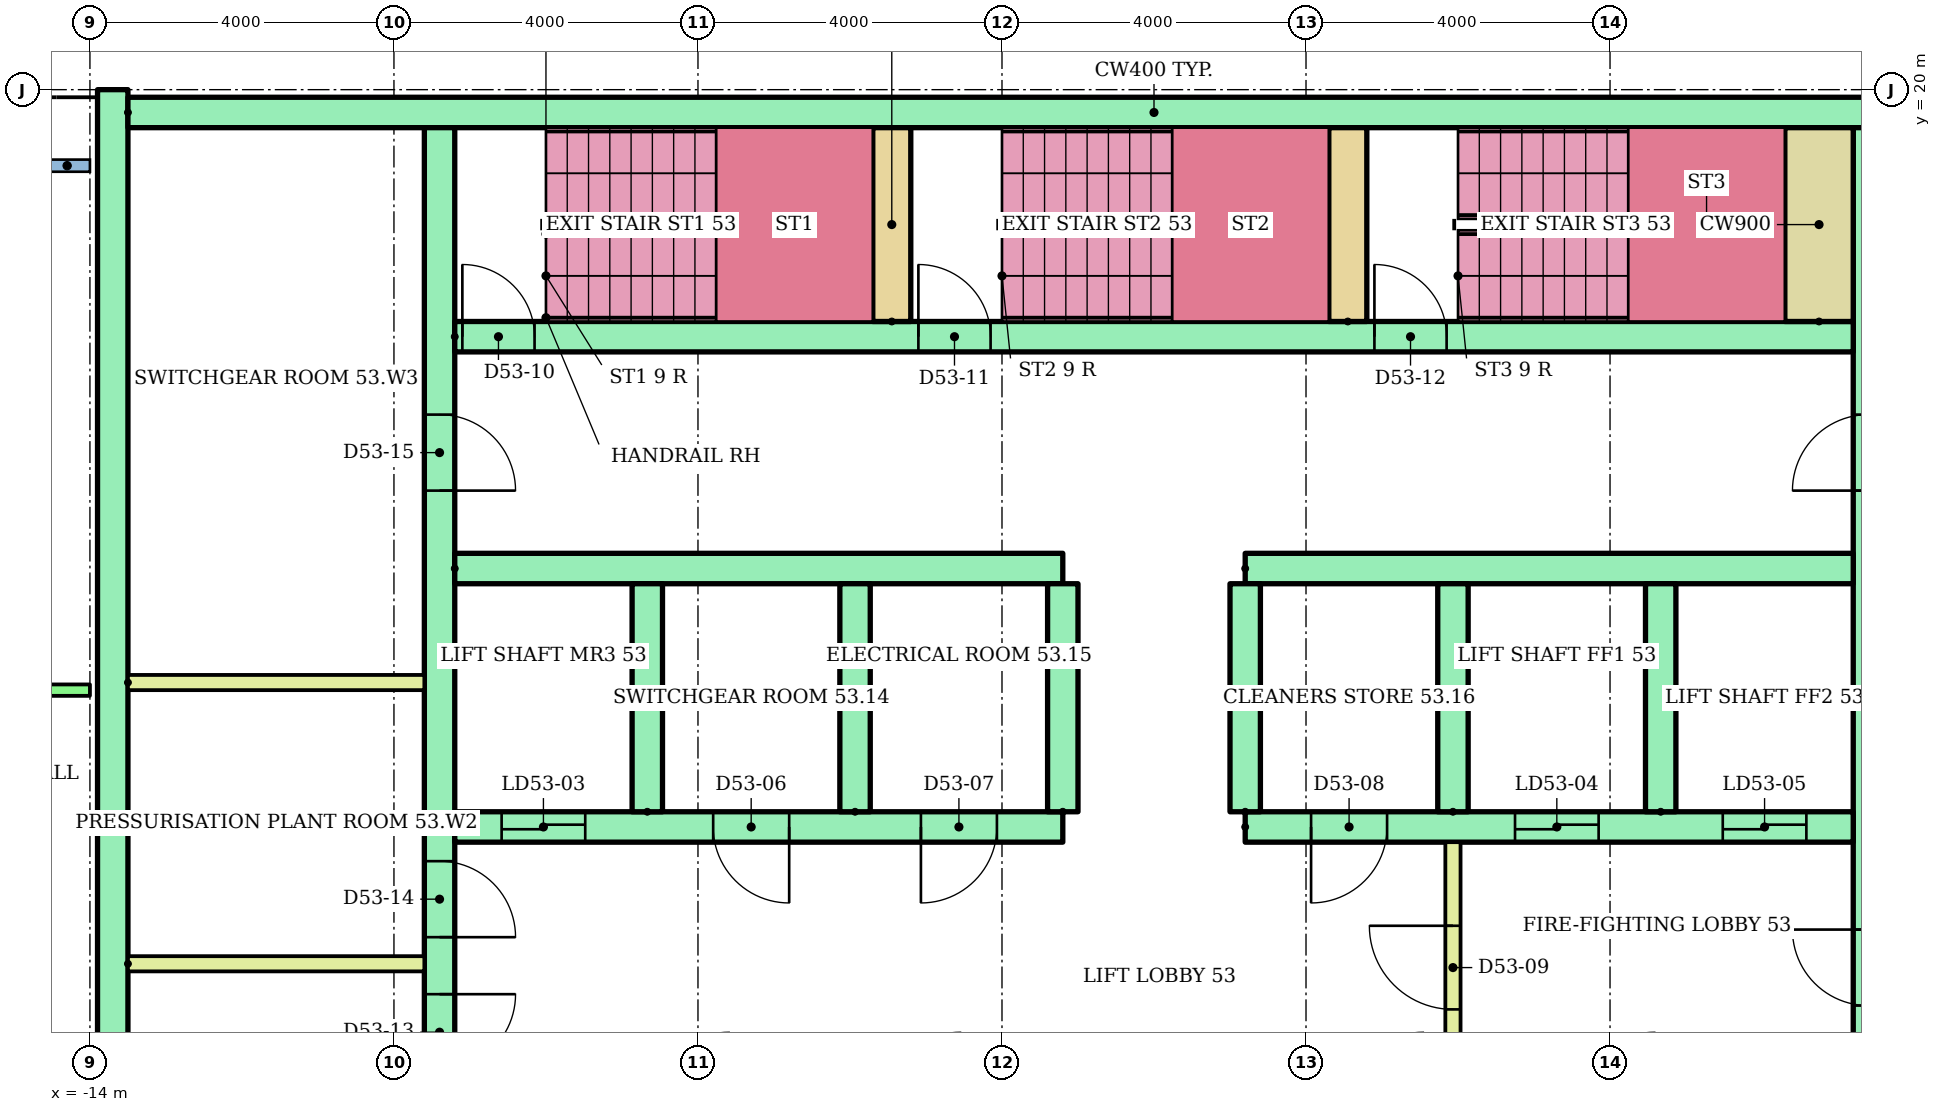
"""IFC4 building model, lengths in metres.
Left out: names, types, materials, properties, quantities, classifications, styles, units other than length and angle.
Written with IfcOpenShell. Run it as: python <this file> out.ifc"""

import sys

from ifc_helpers import new_model, si_unit, direction, frame, frame_2d, origin, place, context, subcontext, project, spatial, rectangle, extrude, element, fill, save


model = new_model("IFC4")
c1 = context("Model", 3, precision=1e-05, world=origin(), true_north=direction((0.0, 1.0)))
c2 = subcontext(c1, "Body", "Model", "MODEL_VIEW")
j1 = project(units=[si_unit("LENGTHUNIT", "METRE"), si_unit("PLANEANGLEUNIT", "RADIAN")], contexts=[c1])
p1 = place(None, origin())
s1 = spatial("IfcSite", under=j1, at=p1, CompositionType="ELEMENT")
p2 = place(p1, origin())
s2 = spatial("IfcBuilding", under=s1, at=p2, CompositionType="ELEMENT")
p3 = place(p2, frame((0.0, 0.0, 207.6)))
s3 = spatial("IfcBuildingStorey", under=s2, at=p3, CompositionType="ELEMENT", Elevation=207.6)
p4 = place(p3, frame((-13.7, 3.0, 0.0), z_axis=(0.0, 0.0, 1.0), x_axis=(0.0, 1.0, 0.0)))
e1 = element("IfcWall", 1, at=p4, inside=s3, PredefinedType="SHEAR", context=c2, shape_type="SweptSolid", body=[
    extrude(rectangle(XDim=17.0, YDim=0.4, at=frame_2d((8.5, 0.0))), origin(), (0.0, 0.0, 1.0), 2.92),
])
p5 = place(p3, frame((-13.5, 19.7, 0.0)))
e2 = element("IfcWall", 2, at=p5, inside=s3, PredefinedType="SHEAR", context=c2, shape_type="SweptSolid", body=[
    extrude(rectangle(XDim=27.0, YDim=0.4, at=frame_2d((13.5, 0.0))), origin(), (0.0, 0.0, 1.0), 2.92),
])
p6 = place(p3, frame((-9.4, 6.8, 0.0), z_axis=(0.0, 0.0, 1.0), x_axis=(0.0, 1.0, 0.0)))
e3 = element("IfcWall", 3, at=p6, inside=s3, PredefinedType="SHEAR", context=c2, shape_type="SweptSolid", body=[
    extrude(rectangle(XDim=12.7, YDim=0.4, at=frame_2d((6.35, 0.0))), origin(), (0.0, 0.0, 1.0), 2.92),
])
p7 = place(p6, frame((0.3, 0.0, 0.0)))
e4 = element("IfcOpeningElement", 4, at=p7, cuts=e3, PredefinedType="OPENING", context=c2, shape_type="SweptSolid", body=[
    extrude(rectangle(XDim=1.0, YDim=2.1, at=frame_2d((0.5, 1.05))), frame((0.0, 0.21, 0.0), z_axis=(0.0, -1.0, 0.0), x_axis=(1.0, 0.0, 0.0)), (0.0, 0.0, 1.0), 0.42),
])
p8 = place(p6, frame((2.05, 0.0, 0.0)))
e5 = element("IfcOpeningElement", 5, at=p8, cuts=e3, PredefinedType="OPENING", context=c2, shape_type="SweptSolid", body=[
    extrude(rectangle(XDim=1.0, YDim=2.1, at=frame_2d((0.5, 1.05))), frame((0.0, 0.21, 0.0), z_axis=(0.0, -1.0, 0.0), x_axis=(1.0, 0.0, 0.0)), (0.0, 0.0, 1.0), 0.42),
])
p9 = place(p6, frame((7.925, 0.0, 0.0)))
e6 = element("IfcOpeningElement", 6, at=p9, cuts=e3, PredefinedType="OPENING", context=c2, shape_type="SweptSolid", body=[
    extrude(rectangle(XDim=1.0, YDim=2.1, at=frame_2d((0.5, 1.05))), frame((0.0, 0.21, 0.0), z_axis=(0.0, -1.0, 0.0), x_axis=(1.0, 0.0, 0.0)), (0.0, 0.0, 1.0), 0.42),
])
p10 = place(p3, frame((9.4, 6.8, 0.0), z_axis=(0.0, 0.0, 1.0), x_axis=(0.0, 1.0, 0.0)))
e7 = element("IfcWall", 7, at=p10, inside=s3, PredefinedType="SHEAR", context=c2, shape_type="SweptSolid", body=[
    extrude(rectangle(XDim=12.7, YDim=0.4, at=frame_2d((6.35, 0.0))), origin(), (0.0, 0.0, 1.0), 2.92),
])
p11 = place(p10, frame((1.15, 0.0, 0.0)))
e8 = element("IfcOpeningElement", 8, at=p11, cuts=e7, PredefinedType="OPENING", context=c2, shape_type="SweptSolid", body=[
    extrude(rectangle(XDim=1.0, YDim=2.1, at=frame_2d((0.5, 1.05))), frame((0.0, 0.21, 0.0), z_axis=(0.0, -1.0, 0.0), x_axis=(1.0, 0.0, 0.0)), (0.0, 0.0, 1.0), 0.42),
])
p12 = place(p10, frame((7.925, 0.0, 0.0)))
e9 = element("IfcOpeningElement", 9, at=p12, cuts=e7, PredefinedType="OPENING", context=c2, shape_type="SweptSolid", body=[
    extrude(rectangle(XDim=1.0, YDim=2.1, at=frame_2d((0.5, 1.05))), frame((0.0, 0.21, 0.0), z_axis=(0.0, -1.0, 0.0), x_axis=(1.0, 0.0, 0.0)), (0.0, 0.0, 1.0), 0.42),
])
p13 = place(p3, frame((-9.2, 10.3, 0.0)))
e10 = element("IfcWall", 10, at=p13, inside=s3, PredefinedType="SHEAR", context=c2, shape_type="SweptSolid", body=[
    extrude(rectangle(XDim=8.0, YDim=0.4, at=frame_2d((4.0, 0.0))), origin(), (0.0, 0.0, 1.0), 2.92),
])
p14 = place(p13, frame((0.617, 0.0, 0.0)))
e11 = element("IfcOpeningElement", 11, at=p14, cuts=e10, PredefinedType="OPENING", context=c2, shape_type="SweptSolid", body=[
    extrude(rectangle(XDim=1.1, YDim=2.1, at=frame_2d((0.55, 1.05))), frame((0.0, 0.21, 0.0), z_axis=(0.0, -1.0, 0.0), x_axis=(1.0, 0.0, 0.0)), (0.0, 0.0, 1.0), 0.42),
])
p15 = place(p13, frame((3.4, 0.0, 0.0)))
e12 = element("IfcOpeningElement", 12, at=p15, cuts=e10, PredefinedType="OPENING", context=c2, shape_type="SweptSolid", body=[
    extrude(rectangle(XDim=1.0, YDim=2.1, at=frame_2d((0.5, 1.05))), frame((0.0, 0.21, 0.0), z_axis=(0.0, -1.0, 0.0), x_axis=(1.0, 0.0, 0.0)), (0.0, 0.0, 1.0), 0.42),
])
p16 = place(p13, frame((6.133, 0.0, 0.0)))
e13 = element("IfcOpeningElement", 13, at=p16, cuts=e10, PredefinedType="OPENING", context=c2, shape_type="SweptSolid", body=[
    extrude(rectangle(XDim=1.0, YDim=2.1, at=frame_2d((0.5, 1.05))), frame((0.0, 0.21, 0.0), z_axis=(0.0, -1.0, 0.0), x_axis=(1.0, 0.0, 0.0)), (0.0, 0.0, 1.0), 0.42),
])
p17 = place(p3, frame((-9.2, 13.7, 0.0)))
e14 = element("IfcWall", 14, at=p17, inside=s3, PredefinedType="SHEAR", context=c2, shape_type="SweptSolid", body=[
    extrude(rectangle(XDim=8.0, YDim=0.4, at=frame_2d((4.0, 0.0))), origin(), (0.0, 0.0, 1.0), 2.92),
])
p18 = place(p3, frame((1.2, 10.3, 0.0)))
e15 = element("IfcWall", 15, at=p18, inside=s3, PredefinedType="SHEAR", context=c2, shape_type="SweptSolid", body=[
    extrude(rectangle(XDim=8.0, YDim=0.4, at=frame_2d((4.0, 0.0))), origin(), (0.0, 0.0, 1.0), 2.92),
])
p19 = place(p18, frame((3.55, 0.0, 0.0)))
e16 = element("IfcOpeningElement", 16, at=p19, cuts=e15, PredefinedType="OPENING", context=c2, shape_type="SweptSolid", body=[
    extrude(rectangle(XDim=1.1, YDim=2.1, at=frame_2d((0.55, 1.05))), frame((0.0, 0.21, 0.0), z_axis=(0.0, -1.0, 0.0), x_axis=(1.0, 0.0, 0.0)), (0.0, 0.0, 1.0), 0.42),
])
p20 = place(p18, frame((6.283, 0.0, 0.0)))
e17 = element("IfcOpeningElement", 17, at=p20, cuts=e15, PredefinedType="OPENING", context=c2, shape_type="SweptSolid", body=[
    extrude(rectangle(XDim=1.1, YDim=2.1, at=frame_2d((0.55, 1.05))), frame((0.0, 0.21, 0.0), z_axis=(0.0, -1.0, 0.0), x_axis=(1.0, 0.0, 0.0)), (0.0, 0.0, 1.0), 0.42),
])
p21 = place(p18, frame((0.867, 0.0, 0.0)))
e18 = element("IfcOpeningElement", 18, at=p21, cuts=e15, PredefinedType="OPENING", context=c2, shape_type="SweptSolid", body=[
    extrude(rectangle(XDim=1.0, YDim=2.1, at=frame_2d((0.5, 1.05))), frame((0.0, 0.21, 0.0), z_axis=(0.0, -1.0, 0.0), x_axis=(1.0, 0.0, 0.0)), (0.0, 0.0, 1.0), 0.42),
])
p22 = place(p3, frame((1.2, 13.7, 0.0)))
e19 = element("IfcWall", 19, at=p22, inside=s3, PredefinedType="SHEAR", context=c2, shape_type="SweptSolid", body=[
    extrude(rectangle(XDim=8.0, YDim=0.4, at=frame_2d((4.0, 0.0))), origin(), (0.0, 0.0, 1.0), 2.92),
])
for number, where, z_axis, x_axis in (
    (20, (-6.667, 10.5, 0.0), (0.0, 0.0, 1.0), (0.0, 1.0, 0.0)),
    (21, (-3.933, 10.5, 0.0), (0.0, 0.0, 1.0), (0.0, 1.0, 0.0)),
    (22, (-1.2, 10.5, 0.0), (0.0, 0.0, 1.0), (0.0, 1.0, 0.0)),
    (23, (1.2, 10.5, 0.0), (0.0, 0.0, 1.0), (0.0, 1.0, 0.0)),
    (24, (3.933, 10.5, 0.0), (0.0, 0.0, 1.0), (0.0, 1.0, 0.0)),
    (25, (6.667, 10.5, 0.0), (0.0, 0.0, 1.0), (0.0, 1.0, 0.0)),
):
    element("IfcWall", number, at=place(p3, frame(where, z_axis=z_axis, x_axis=x_axis)), inside=s3, PredefinedType="SHEAR", context=c2, shape_type="SweptSolid", body=[
        extrude(rectangle(XDim=3.0, YDim=0.4, at=frame_2d((1.5, 0.0))), origin(), (0.0, 0.0, 1.0), 2.92),
    ])
p23 = place(p3, frame((3.933, 6.8, 0.0), z_axis=(0.0, 0.0, 1.0), x_axis=(0.0, 1.0, 0.0)))
e26 = element("IfcWall", 26, at=p23, inside=s3, PredefinedType="PARTITIONING", context=c2, shape_type="SweptSolid", body=[
    extrude(rectangle(XDim=3.3, YDim=0.2, at=frame_2d((1.65, 0.0))), origin(), (0.0, 0.0, 1.0), 2.92),
])
p24 = place(p23, frame((1.1, 0.0, 0.0)))
e27 = element("IfcOpeningElement", 27, at=p24, cuts=e26, PredefinedType="OPENING", context=c2, shape_type="SweptSolid", body=[
    extrude(rectangle(XDim=1.1, YDim=2.1, at=frame_2d((0.55, 1.05))), frame((0.0, 0.11, 0.0), z_axis=(0.0, -1.0, 0.0), x_axis=(1.0, 0.0, 0.0)), (0.0, 0.0, 1.0), 0.22),
])
p25 = place(p3, frame((-9.2, 16.75, 0.0)))
e28 = element("IfcWall", 28, at=p25, inside=s3, PredefinedType="SHEAR", context=c2, shape_type="SweptSolid", body=[
    extrude(rectangle(XDim=18.4, YDim=0.4, at=frame_2d((9.2, 0.0))), origin(), (0.0, 0.0, 1.0), 2.92),
])
p26 = place(p25, frame((0.1, 0.0, 0.0)))
e29 = element("IfcOpeningElement", 29, at=p26, cuts=e28, PredefinedType="OPENING", context=c2, shape_type="SweptSolid", body=[
    extrude(rectangle(XDim=0.95, YDim=2.1, at=frame_2d((0.475, 1.05))), frame((0.0, 0.21, 0.0), z_axis=(0.0, -1.0, 0.0), x_axis=(1.0, 0.0, 0.0)), (0.0, 0.0, 1.0), 0.42),
])
p27 = place(p25, frame((6.1, 0.0, 0.0)))
e30 = element("IfcOpeningElement", 30, at=p27, cuts=e28, PredefinedType="OPENING", context=c2, shape_type="SweptSolid", body=[
    extrude(rectangle(XDim=0.95, YDim=2.1, at=frame_2d((0.475, 1.05))), frame((0.0, 0.21, 0.0), z_axis=(0.0, -1.0, 0.0), x_axis=(1.0, 0.0, 0.0)), (0.0, 0.0, 1.0), 0.42),
])
p28 = place(p25, frame((12.1, 0.0, 0.0)))
e31 = element("IfcOpeningElement", 31, at=p28, cuts=e28, PredefinedType="OPENING", context=c2, shape_type="SweptSolid", body=[
    extrude(rectangle(XDim=0.95, YDim=2.1, at=frame_2d((0.475, 1.05))), frame((0.0, 0.21, 0.0), z_axis=(0.0, -1.0, 0.0), x_axis=(1.0, 0.0, 0.0)), (0.0, 0.0, 1.0), 0.42),
])
for number, where, z_axis, x_axis in (
    (32, (-3.45, 16.95, 0.0), (0.0, 0.0, 1.0), (0.0, 1.0, 0.0)),
    (33, (2.55, 16.95, 0.0), (0.0, 0.0, 1.0), (0.0, 1.0, 0.0)),
):
    element("IfcWall", number, at=place(p3, frame(where, z_axis=z_axis, x_axis=x_axis)), inside=s3, PredefinedType="SHEAR", context=c2, shape_type="SweptSolid", body=[
        extrude(rectangle(XDim=2.55, YDim=0.5, at=frame_2d((1.275, 0.0))), origin(), (0.0, 0.0, 1.0), 2.92),
    ])
p29 = place(p3, frame((8.75, 16.95, 0.0), z_axis=(0.0, 0.0, 1.0), x_axis=(0.0, 1.0, 0.0)))
e34 = element("IfcWall", 34, at=p29, inside=s3, PredefinedType="SHEAR", context=c2, shape_type="SweptSolid", body=[
    extrude(rectangle(XDim=2.55, YDim=0.9, at=frame_2d((1.275, 0.0))), origin(), (0.0, 0.0, 1.0), 2.92),
])
for number, where in (
    (35, (-13.5, 8.5, 0.0)),
    (36, (-13.5, 12.2, 0.0)),
):
    element("IfcWall", number, at=place(p3, frame(where)), inside=s3, PredefinedType="PARTITIONING", context=c2, shape_type="SweptSolid", body=[
        extrude(rectangle(XDim=3.9, YDim=0.2, at=frame_2d((1.95, 0.0))), origin(), (0.0, 0.0, 1.0), 2.92),
    ])
p30 = place(p3, frame((-28.92, 12.1, 0.0)))
e37 = element("IfcWall", 37, at=p30, inside=s3, PredefinedType="PARTITIONING", context=c2, shape_type="SweptSolid", body=[
    extrude(rectangle(XDim=14.92, YDim=0.15, at=frame_2d((7.46, 0.0))), origin(), (0.0, 0.0, 1.0), 2.4),
])
p31 = place(p30, frame((1.97, 0.0, 0.0)))
e38 = element("IfcOpeningElement", 38, at=p31, cuts=e37, PredefinedType="OPENING", context=c2, shape_type="SweptSolid", body=[
    extrude(rectangle(XDim=1.0, YDim=2.1, at=frame_2d((0.5, 1.05))), frame((0.0, 0.085, 0.0), z_axis=(0.0, -1.0, 0.0), x_axis=(1.0, 0.0, 0.0)), (0.0, 0.0, 1.0), 0.17),
])
p32 = place(p30, frame((9.32, 0.0, 0.0)))
e39 = element("IfcOpeningElement", 39, at=p32, cuts=e37, PredefinedType="OPENING", context=c2, shape_type="SweptSolid", body=[
    extrude(rectangle(XDim=1.0, YDim=2.1, at=frame_2d((0.5, 1.05))), frame((0.0, 0.085, 0.0), z_axis=(0.0, -1.0, 0.0), x_axis=(1.0, 0.0, 0.0)), (0.0, 0.0, 1.0), 0.17),
])
p33 = place(p14, origin())
e40 = element("IfcDoor", 40, at=p33, inside=s3, OperationType="SLIDING_TO_LEFT", PredefinedType="DOOR", context=c2, shape_type="SweptSolid", body=[
    extrude(rectangle(XDim=1.1, YDim=2.1, at=frame_2d((0.55, 1.05))), frame((0.0, 0.025, 0.0), z_axis=(0.0, -1.0, 0.0), x_axis=(1.0, 0.0, 0.0)), (0.0, 0.0, 1.0), 0.05),
])
fill(e11, e40)
p34 = place(p19, origin())
e41 = element("IfcDoor", 41, at=p34, inside=s3, OperationType="SLIDING_TO_LEFT", PredefinedType="DOOR", context=c2, shape_type="SweptSolid", body=[
    extrude(rectangle(XDim=1.1, YDim=2.1, at=frame_2d((0.55, 1.05))), frame((0.0, 0.025, 0.0), z_axis=(0.0, -1.0, 0.0), x_axis=(1.0, 0.0, 0.0)), (0.0, 0.0, 1.0), 0.05),
])
fill(e16, e41)
p35 = place(p20, origin())
e42 = element("IfcDoor", 42, at=p35, inside=s3, OperationType="SLIDING_TO_LEFT", PredefinedType="DOOR", context=c2, shape_type="SweptSolid", body=[
    extrude(rectangle(XDim=1.1, YDim=2.1, at=frame_2d((0.55, 1.05))), frame((0.0, 0.025, 0.0), z_axis=(0.0, -1.0, 0.0), x_axis=(1.0, 0.0, 0.0)), (0.0, 0.0, 1.0), 0.05),
])
fill(e17, e42)
p36 = place(p15, frame((1.0, 0.0, 0.0), z_axis=(0.0, 0.0, 1.0), x_axis=(-1.0, 0.0, 0.0)))
e43 = element("IfcDoor", 43, at=p36, inside=s3, OperationType="SINGLE_SWING_RIGHT", PredefinedType="DOOR", context=c2, shape_type="SweptSolid", body=[
    extrude(rectangle(XDim=1.0, YDim=2.1, at=frame_2d((0.5, 1.05))), frame((0.0, 0.025, 0.0), z_axis=(0.0, -1.0, 0.0), x_axis=(1.0, 0.0, 0.0)), (0.0, 0.0, 1.0), 0.05),
])
fill(e12, e43)
p37 = place(p16, frame((1.0, 0.0, 0.0), z_axis=(0.0, 0.0, 1.0), x_axis=(-1.0, 0.0, 0.0)))
e44 = element("IfcDoor", 44, at=p37, inside=s3, OperationType="SINGLE_SWING_LEFT", PredefinedType="DOOR", context=c2, shape_type="SweptSolid", body=[
    extrude(rectangle(XDim=1.0, YDim=2.1, at=frame_2d((0.5, 1.05))), frame((0.0, 0.025, 0.0), z_axis=(0.0, -1.0, 0.0), x_axis=(1.0, 0.0, 0.0)), (0.0, 0.0, 1.0), 0.05),
])
fill(e13, e44)
p38 = place(p21, frame((1.0, 0.0, 0.0), z_axis=(0.0, 0.0, 1.0), x_axis=(-1.0, 0.0, 0.0)))
e45 = element("IfcDoor", 45, at=p38, inside=s3, OperationType="SINGLE_SWING_LEFT", PredefinedType="DOOR", context=c2, shape_type="SweptSolid", body=[
    extrude(rectangle(XDim=1.0, YDim=2.1, at=frame_2d((0.5, 1.05))), frame((0.0, 0.025, 0.0), z_axis=(0.0, -1.0, 0.0), x_axis=(1.0, 0.0, 0.0)), (0.0, 0.0, 1.0), 0.05),
])
fill(e18, e45)
p39 = place(p24, origin())
e46 = element("IfcDoor", 46, at=p39, inside=s3, OperationType="SINGLE_SWING_RIGHT", PredefinedType="DOOR", context=c2, shape_type="SweptSolid", body=[
    extrude(rectangle(XDim=1.1, YDim=2.1, at=frame_2d((0.55, 1.05))), frame((0.0, 0.025, 0.0), z_axis=(0.0, -1.0, 0.0), x_axis=(1.0, 0.0, 0.0)), (0.0, 0.0, 1.0), 0.05),
])
fill(e27, e46)
p40 = place(p26, origin())
e47 = element("IfcDoor", 47, at=p40, inside=s3, OperationType="SINGLE_SWING_LEFT", PredefinedType="DOOR", context=c2, shape_type="SweptSolid", body=[
    extrude(rectangle(XDim=0.95, YDim=2.1, at=frame_2d((0.475, 1.05))), frame((0.0, 0.025, 0.0), z_axis=(0.0, -1.0, 0.0), x_axis=(1.0, 0.0, 0.0)), (0.0, 0.0, 1.0), 0.05),
])
fill(e29, e47)
p41 = place(p27, origin())
e48 = element("IfcDoor", 48, at=p41, inside=s3, OperationType="SINGLE_SWING_LEFT", PredefinedType="DOOR", context=c2, shape_type="SweptSolid", body=[
    extrude(rectangle(XDim=0.95, YDim=2.1, at=frame_2d((0.475, 1.05))), frame((0.0, 0.025, 0.0), z_axis=(0.0, -1.0, 0.0), x_axis=(1.0, 0.0, 0.0)), (0.0, 0.0, 1.0), 0.05),
])
fill(e30, e48)
p42 = place(p28, origin())
e49 = element("IfcDoor", 49, at=p42, inside=s3, OperationType="SINGLE_SWING_LEFT", PredefinedType="DOOR", context=c2, shape_type="SweptSolid", body=[
    extrude(rectangle(XDim=0.95, YDim=2.1, at=frame_2d((0.475, 1.05))), frame((0.0, 0.025, 0.0), z_axis=(0.0, -1.0, 0.0), x_axis=(1.0, 0.0, 0.0)), (0.0, 0.0, 1.0), 0.05),
])
fill(e31, e49)
p43 = place(p7, frame((1.0, 0.0, 0.0), z_axis=(0.0, 0.0, 1.0), x_axis=(-1.0, 0.0, 0.0)))
e50 = element("IfcDoor", 50, at=p43, inside=s3, OperationType="SINGLE_SWING_RIGHT", PredefinedType="DOOR", context=c2, shape_type="SweptSolid", body=[
    extrude(rectangle(XDim=1.0, YDim=2.1, at=frame_2d((0.5, 1.05))), frame((0.0, 0.025, 0.0), z_axis=(0.0, -1.0, 0.0), x_axis=(1.0, 0.0, 0.0)), (0.0, 0.0, 1.0), 0.05),
])
fill(e4, e50)
p44 = place(p8, frame((1.0, 0.0, 0.0), z_axis=(0.0, 0.0, 1.0), x_axis=(-1.0, 0.0, 0.0)))
e51 = element("IfcDoor", 51, at=p44, inside=s3, OperationType="SINGLE_SWING_LEFT", PredefinedType="DOOR", context=c2, shape_type="SweptSolid", body=[
    extrude(rectangle(XDim=1.0, YDim=2.1, at=frame_2d((0.5, 1.05))), frame((0.0, 0.025, 0.0), z_axis=(0.0, -1.0, 0.0), x_axis=(1.0, 0.0, 0.0)), (0.0, 0.0, 1.0), 0.05),
])
fill(e5, e51)
p45 = place(p9, frame((1.0, 0.0, 0.0), z_axis=(0.0, 0.0, 1.0), x_axis=(-1.0, 0.0, 0.0)))
e52 = element("IfcDoor", 52, at=p45, inside=s3, OperationType="SINGLE_SWING_LEFT", PredefinedType="DOOR", context=c2, shape_type="SweptSolid", body=[
    extrude(rectangle(XDim=1.0, YDim=2.1, at=frame_2d((0.5, 1.05))), frame((0.0, 0.025, 0.0), z_axis=(0.0, -1.0, 0.0), x_axis=(1.0, 0.0, 0.0)), (0.0, 0.0, 1.0), 0.05),
])
fill(e6, e52)
save(model, sys.argv[1])
